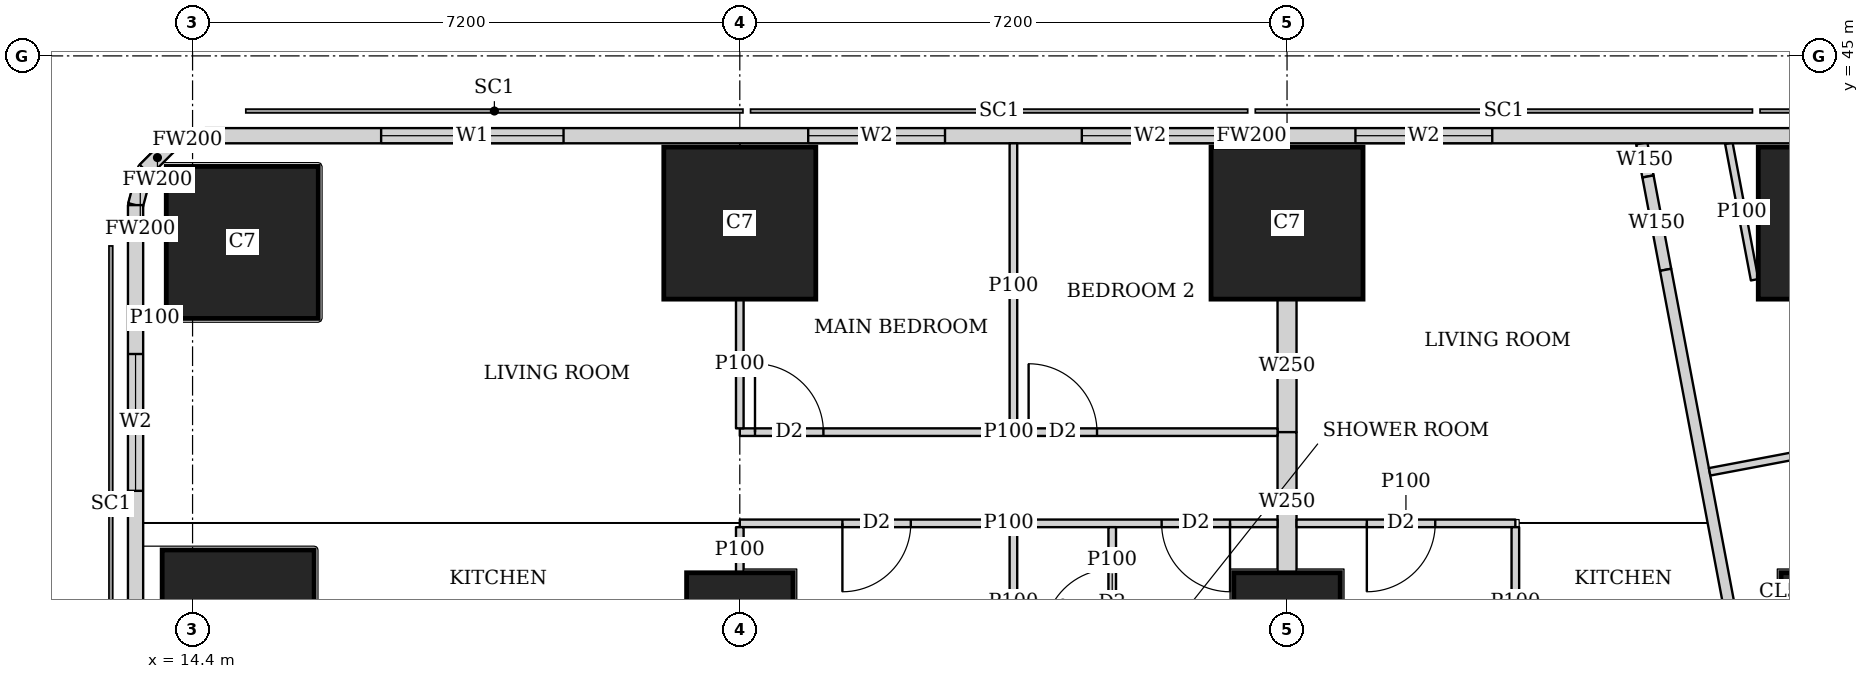
"""IFC4 building model, lengths in metres.
Left out: names, types, materials, properties, quantities, classifications, styles, units other than length and angle.
Written with IfcOpenShell. Run it as: python <this file> out.ifc"""

import sys

from ifc_helpers import new_model, si_unit, direction, frame, frame_2d, origin, origin_2d, place, context, subcontext, project, spatial, rectangle, extrude, element, fill, save


model = new_model("IFC4")
c1 = context("Model", 3, precision=1e-05, world=origin(), true_north=direction((0.0, 1.0)))
c2 = subcontext(c1, "Body", "Model", "MODEL_VIEW")
j1 = project(units=[si_unit("LENGTHUNIT", "METRE"), si_unit("PLANEANGLEUNIT", "RADIAN")], contexts=[c1])
p1 = place(None, origin())
s1 = spatial("IfcSite", under=j1, at=p1, CompositionType="ELEMENT")
p2 = place(p1, origin())
s2 = spatial("IfcBuilding", under=s1, at=p2, CompositionType="ELEMENT")
p3 = place(p2, frame((0.0, 0.0, 277.85)))
s3 = spatial("IfcBuildingStorey", under=s2, at=p3, CompositionType="ELEMENT", Elevation=277.85)
p4 = place(p3, frame((15.0, 37.5, 0.0), z_axis=(0.0, 0.0, 1.0), x_axis=(1.0, 0.0, 0.0)))
e1 = element("IfcColumn", 1, at=p4, inside=s3, PredefinedType="COLUMN", context=c2, shape_type="SweptSolid", body=[
    extrude(rectangle(XDim=2.0, YDim=2.0, at=origin_2d()), origin(), (0.0, 0.0, 1.0), 3.75),
])
for number, where, z_axis, x_axis in (
    (2, (21.6, 37.5, 0.0), (0.0, 0.0, 1.0), (1.0, 0.0, 0.0)),
    (3, (28.8, 37.5, 0.0), (0.0, 0.0, 1.0), (1.0, 0.0, 0.0)),
    (4, (36.0, 37.5, 0.0), (0.0, 0.0, 1.0), (1.0, 0.0, 0.0)),
):
    element("IfcColumn", number, at=place(p3, frame(where, z_axis=z_axis, x_axis=x_axis)), inside=s3, PredefinedType="COLUMN", context=c2, shape_type="SweptSolid", body=[
        extrude(rectangle(XDim=1.4, YDim=1.4, at=origin_2d()), origin(), (0.0, 0.0, 1.0), 3.75),
    ])
for number, where, z_axis, x_axis in (
    (5, (15.054, 42.546, 0.0), (0.0, 0.0, 1.0), (1.0, 0.0, 0.0)),
    (6, (21.6, 42.8, 0.0), (0.0, 0.0, 1.0), (1.0, 0.0, 0.0)),
    (7, (28.8, 42.8, 0.0), (0.0, 0.0, 1.0), (1.0, 0.0, 0.0)),
    (8, (36.0, 42.8, 0.0), (0.0, 0.0, 1.0), (1.0, 0.0, 0.0)),
):
    element("IfcColumn", number, at=place(p3, frame(where, z_axis=z_axis, x_axis=x_axis)), inside=s3, PredefinedType="COLUMN", context=c2, shape_type="SweptSolid", body=[
        extrude(rectangle(XDim=2.0, YDim=2.0, at=origin_2d()), origin(), (0.0, 0.0, 1.0), 3.75),
    ])
p5 = place(p3, frame((42.103, 43.95, 0.0), z_axis=(0.0, 0.0, 1.0), x_axis=(-1.0, 0.0, 0.0)))
e9 = element("IfcWall", 9, at=p5, inside=s3, PredefinedType="SOLIDWALL", context=c2, shape_type="SweptSolid", body=[
    extrude(rectangle(XDim=27.54, YDim=0.2, at=frame_2d((13.77, 0.0))), origin(), (0.0, 0.0, 1.0), 3.5),
])
p6 = place(p5, frame((10.603, 0.0, 0.9)))
e10 = element("IfcOpeningElement", 10, at=p6, cuts=e9, PredefinedType="OPENING", context=c2, shape_type="SweptSolid", body=[
    extrude(rectangle(XDim=1.8, YDim=1.5, at=frame_2d((0.9, 0.75))), frame((0.0, 0.11, 0.0), z_axis=(0.0, -1.0, 0.0), x_axis=(1.0, 0.0, 0.0)), (0.0, 0.0, 1.0), 0.22),
])
p7 = place(p5, frame((14.203, 0.0, 0.9)))
e11 = element("IfcOpeningElement", 11, at=p7, cuts=e9, PredefinedType="OPENING", context=c2, shape_type="SweptSolid", body=[
    extrude(rectangle(XDim=1.8, YDim=1.5, at=frame_2d((0.9, 0.75))), frame((0.0, 0.11, 0.0), z_axis=(0.0, -1.0, 0.0), x_axis=(1.0, 0.0, 0.0)), (0.0, 0.0, 1.0), 0.22),
])
p8 = place(p5, frame((17.803, 0.0, 0.9)))
e12 = element("IfcOpeningElement", 12, at=p8, cuts=e9, PredefinedType="OPENING", context=c2, shape_type="SweptSolid", body=[
    extrude(rectangle(XDim=1.8, YDim=1.5, at=frame_2d((0.9, 0.75))), frame((0.0, 0.11, 0.0), z_axis=(0.0, -1.0, 0.0), x_axis=(1.0, 0.0, 0.0)), (0.0, 0.0, 1.0), 0.22),
])
p9 = place(p5, frame((22.822, 0.0, 0.9)))
e13 = element("IfcOpeningElement", 13, at=p9, cuts=e9, PredefinedType="OPENING", context=c2, shape_type="SweptSolid", body=[
    extrude(rectangle(XDim=2.4, YDim=1.5, at=frame_2d((1.2, 0.75))), frame((0.0, 0.11, 0.0), z_axis=(0.0, -1.0, 0.0), x_axis=(1.0, 0.0, 0.0)), (0.0, 0.0, 1.0), 0.22),
])
p10 = place(p3, frame((14.563, 43.95, 0.0), z_axis=(0.0, 0.0, 1.0), x_axis=(-0.965655254015, -0.259826731483, 0.0)))
e14 = element("IfcWall", 14, at=p10, inside=s3, PredefinedType="SOLIDWALL", context=c2, shape_type="SweptSolid", body=[
    extrude(rectangle(XDim=0.477, YDim=0.2, at=frame_2d((0.239, 0.0))), origin(), (0.0, 0.0, 1.0), 3.5),
])
p11 = place(p3, frame((14.102, 43.826, 0.0), z_axis=(0.0, 0.0, 1.0), x_axis=(-0.707369890659, -0.706843573776, 0.0)))
e15 = element("IfcWall", 15, at=p11, inside=s3, PredefinedType="SOLIDWALL", context=c2, shape_type="SweptSolid", body=[
    extrude(rectangle(XDim=0.464, YDim=0.2, at=frame_2d((0.232, 0.0))), origin(), (0.0, 0.0, 1.0), 3.5),
])
p12 = place(p3, frame((13.774, 43.498, 0.0), z_axis=(0.0, 0.0, 1.0), x_axis=(-0.259826731483, -0.965655254015, 0.0)))
e16 = element("IfcWall", 16, at=p12, inside=s3, PredefinedType="SOLIDWALL", context=c2, shape_type="SweptSolid", body=[
    extrude(rectangle(XDim=0.477, YDim=0.2, at=frame_2d((0.239, 0.0))), origin(), (0.0, 0.0, 1.0), 3.5),
])
p13 = place(p3, frame((13.65, 43.037, 0.0), z_axis=(0.0, 0.0, 1.0), x_axis=(0.0, -1.0, 0.0)))
e17 = element("IfcWall", 17, at=p13, inside=s3, PredefinedType="SOLIDWALL", context=c2, shape_type="SweptSolid", body=[
    extrude(rectangle(XDim=35.374, YDim=0.2, at=frame_2d((17.687, 0.0))), origin(), (0.0, 0.0, 1.0), 3.5),
])
p14 = place(p13, frame((1.959, 0.0, 0.9)))
e18 = element("IfcOpeningElement", 18, at=p14, cuts=e17, PredefinedType="OPENING", context=c2, shape_type="SweptSolid", body=[
    extrude(rectangle(XDim=1.8, YDim=1.5, at=frame_2d((0.9, 0.75))), frame((0.0, 0.11, 0.0), z_axis=(0.0, -1.0, 0.0), x_axis=(1.0, 0.0, 0.0)), (0.0, 0.0, 1.0), 0.22),
])
p15 = place(p3, frame((33.467, 43.85, 0.0), z_axis=(0.0, 0.0, 1.0), x_axis=(0.184886516626, -0.982759877066, 0.0)))
e19 = element("IfcWall", 19, at=p15, inside=s3, PredefinedType="SOLIDWALL", context=c2, shape_type="SweptSolid", body=[
    extrude(rectangle(XDim=0.444, YDim=0.15, at=frame_2d((0.222, 0.0))), origin(), (0.0, 0.0, 1.0), 3.5),
])
p16 = place(p3, frame((33.549, 43.414, 0.0), z_axis=(0.0, 0.0, 1.0), x_axis=(0.185585816539, -0.982628060204, 0.0)))
e20 = element("IfcWall", 20, at=p16, inside=s3, PredefinedType="SOLIDWALL", context=c2, shape_type="SweptSolid", body=[
    extrude(rectangle(XDim=1.25, YDim=0.15, at=frame_2d((0.625, 0.0))), origin(), (0.0, 0.0, 1.0), 2.05),
])
p17 = place(p3, frame((33.781, 42.186, 0.0), z_axis=(0.0, 0.0, 1.0), x_axis=(0.185593518645, -0.9826266055, 0.0)))
e21 = element("IfcWall", 21, at=p17, inside=s3, PredefinedType="SOLIDWALL", context=c2, shape_type="SweptSolid", body=[
    extrude(rectangle(XDim=35.961, YDim=0.15, at=frame_2d((17.98, 0.0))), origin(), (0.0, 0.0, 1.0), 2.5),
])
p18 = place(p17, frame((11.76, 0.0, 0.0)))
e22 = element("IfcOpeningElement", 22, at=p18, cuts=e21, PredefinedType="OPENING", context=c2, shape_type="SweptSolid", body=[
    extrude(rectangle(XDim=1.0, YDim=2.1, at=frame_2d((0.5, 1.05))), frame((0.0, 0.085, 0.0), z_axis=(0.0, -1.0, 0.0), x_axis=(1.0, 0.0, 0.0)), (0.0, 0.0, 1.0), 0.17),
])
p19 = place(p17, frame((15.576, 0.0, 0.0)))
e23 = element("IfcOpeningElement", 23, at=p19, cuts=e21, PredefinedType="OPENING", context=c2, shape_type="SweptSolid", body=[
    extrude(rectangle(XDim=1.0, YDim=2.1, at=frame_2d((0.5, 1.05))), frame((0.0, 0.085, 0.0), z_axis=(0.0, -1.0, 0.0), x_axis=(1.0, 0.0, 0.0)), (0.0, 0.0, 1.0), 0.17),
])
p20 = place(p17, frame((30.502, 0.0, 0.0)))
e24 = element("IfcOpeningElement", 24, at=p20, cuts=e21, PredefinedType="OPENING", context=c2, shape_type="SweptSolid", body=[
    extrude(rectangle(XDim=1.0, YDim=2.1, at=frame_2d((0.5, 1.05))), frame((0.0, 0.085, 0.0), z_axis=(0.0, -1.0, 0.0), x_axis=(1.0, 0.0, 0.0)), (0.0, 0.0, 1.0), 0.17),
])
p21 = place(p3, frame((34.952, 42.055, 0.0), z_axis=(0.0, 0.0, 1.0), x_axis=(-0.185490642006, 0.98264603074, 0.0)))
e25 = element("IfcWall", 25, at=p21, inside=s3, PredefinedType="PARTITIONING", context=c2, shape_type="SweptSolid", body=[
    extrude(rectangle(XDim=1.827, YDim=0.1, at=frame_2d((0.914, 0.0))), origin(), (0.0, 0.0, 1.0), 2.05),
])
p22 = place(p3, frame((37.823, 40.182, 0.0), z_axis=(0.0, 0.0, 1.0), x_axis=(-0.98263926043, -0.185526504472, 0.0)))
e26 = element("IfcWall", 26, at=p22, inside=s3, PredefinedType="PARTITIONING", context=c2, shape_type="SweptSolid", body=[
    extrude(rectangle(XDim=3.524, YDim=0.1, at=frame_2d((1.762, 0.0))), origin(), (0.0, 0.0, 1.0), 3.5),
])
p23 = place(p3, frame((14.054, 41.546, 0.0), z_axis=(0.0, 0.0, 1.0), x_axis=(-1.0, 0.0, 0.0)))
e27 = element("IfcWall", 27, at=p23, inside=s3, PredefinedType="PARTITIONING", context=c2, shape_type="SweptSolid", body=[
    extrude(rectangle(XDim=0.304, YDim=0.1, at=frame_2d((0.152, 0.0))), origin(), (0.0, 0.0, 1.0), 3.5),
])
p24 = place(p3, frame((21.6, 40.05, 0.0), z_axis=(0.0, 0.0, 1.0), x_axis=(1.0, 0.0, 0.0)))
e28 = element("IfcWall", 28, at=p24, inside=s3, PredefinedType="PARTITIONING", context=c2, shape_type="SweptSolid", body=[
    extrude(rectangle(XDim=7.075, YDim=0.1, at=frame_2d((3.538, 0.0))), origin(), (0.0, 0.0, 1.0), 3.5),
])
p25 = place(p24, frame((0.2, 0.0, 0.0)))
e29 = element("IfcOpeningElement", 29, at=p25, cuts=e28, PredefinedType="OPENING", context=c2, shape_type="SweptSolid", body=[
    extrude(rectangle(XDim=0.9, YDim=2.1, at=frame_2d((0.45, 1.05))), frame((0.0, 0.06, 0.0), z_axis=(0.0, -1.0, 0.0), x_axis=(1.0, 0.0, 0.0)), (0.0, 0.0, 1.0), 0.12),
])
p26 = place(p24, frame((3.8, 0.0, 0.0)))
e30 = element("IfcOpeningElement", 30, at=p26, cuts=e28, PredefinedType="OPENING", context=c2, shape_type="SweptSolid", body=[
    extrude(rectangle(XDim=0.9, YDim=2.1, at=frame_2d((0.45, 1.05))), frame((0.0, 0.06, 0.0), z_axis=(0.0, -1.0, 0.0), x_axis=(1.0, 0.0, 0.0)), (0.0, 0.0, 1.0), 0.12),
])
p27 = place(p3, frame((21.6, 38.85, 0.0), z_axis=(0.0, 0.0, 1.0), x_axis=(1.0, 0.0, 0.0)))
e31 = element("IfcWall", 31, at=p27, inside=s3, PredefinedType="PARTITIONING", context=c2, shape_type="SweptSolid", body=[
    extrude(rectangle(XDim=7.075, YDim=0.1, at=frame_2d((3.538, 0.0))), origin(), (0.0, 0.0, 1.0), 3.5),
])
p28 = place(p27, frame((1.35, 0.0, 0.0)))
e32 = element("IfcOpeningElement", 32, at=p28, cuts=e31, PredefinedType="OPENING", context=c2, shape_type="SweptSolid", body=[
    extrude(rectangle(XDim=0.9, YDim=2.1, at=frame_2d((0.45, 1.05))), frame((0.0, 0.06, 0.0), z_axis=(0.0, -1.0, 0.0), x_axis=(1.0, 0.0, 0.0)), (0.0, 0.0, 1.0), 0.12),
])
p29 = place(p27, frame((5.55, 0.0, 0.0)))
e33 = element("IfcOpeningElement", 33, at=p29, cuts=e31, PredefinedType="OPENING", context=c2, shape_type="SweptSolid", body=[
    extrude(rectangle(XDim=0.9, YDim=2.1, at=frame_2d((0.45, 1.05))), frame((0.0, 0.06, 0.0), z_axis=(0.0, -1.0, 0.0), x_axis=(1.0, 0.0, 0.0)), (0.0, 0.0, 1.0), 0.12),
])
p30 = place(p3, frame((21.6, 40.1, 0.0), z_axis=(0.0, 0.0, 1.0), x_axis=(0.0, 1.0, 0.0)))
e34 = element("IfcWall", 34, at=p30, inside=s3, PredefinedType="PARTITIONING", context=c2, shape_type="SweptSolid", body=[
    extrude(rectangle(XDim=1.699, YDim=0.1, at=frame_2d((0.85, 0.0))), origin(), (0.0, 0.0, 1.0), 3.5),
])
p31 = place(p3, frame((25.2, 40.1, 0.0), z_axis=(0.0, 0.0, 1.0), x_axis=(0.0, 1.0, 0.0)))
e35 = element("IfcWall", 35, at=p31, inside=s3, PredefinedType="PARTITIONING", context=c2, shape_type="SweptSolid", body=[
    extrude(rectangle(XDim=3.75, YDim=0.1, at=frame_2d((1.875, 0.0))), origin(), (0.0, 0.0, 1.0), 2.05),
])
p32 = place(p3, frame((21.6, 38.201, 0.0), z_axis=(0.0, 0.0, 1.0), x_axis=(0.0, 1.0, 0.0)))
e36 = element("IfcWall", 36, at=p32, inside=s3, PredefinedType="PARTITIONING", context=c2, shape_type="SweptSolid", body=[
    extrude(rectangle(XDim=0.599, YDim=0.1, at=frame_2d((0.3, 0.0))), origin(), (0.0, 0.0, 1.0), 3.5),
])
p33 = place(p3, frame((25.2, 36.825, 0.0), z_axis=(0.0, 0.0, 1.0), x_axis=(0.0, 1.0, 0.0)))
e37 = element("IfcWall", 37, at=p33, inside=s3, PredefinedType="PARTITIONING", context=c2, shape_type="SweptSolid", body=[
    extrude(rectangle(XDim=1.975, YDim=0.1, at=frame_2d((0.988, 0.0))), origin(), (0.0, 0.0, 1.0), 3.5),
])
p34 = place(p3, frame((26.5, 36.825, 0.0), z_axis=(0.0, 0.0, 1.0), x_axis=(0.0, 1.0, 0.0)))
e38 = element("IfcWall", 38, at=p34, inside=s3, PredefinedType="PARTITIONING", context=c2, shape_type="SweptSolid", body=[
    extrude(rectangle(XDim=1.975, YDim=0.1, at=frame_2d((0.988, 0.0))), origin(), (0.0, 0.0, 1.0), 3.5),
])
p35 = place(p34, frame((0.525, 0.0, 0.0)))
e39 = element("IfcOpeningElement", 39, at=p35, cuts=e38, PredefinedType="OPENING", context=c2, shape_type="SweptSolid", body=[
    extrude(rectangle(XDim=0.9, YDim=2.1, at=frame_2d((0.45, 1.05))), frame((0.0, 0.06, 0.0), z_axis=(0.0, -1.0, 0.0), x_axis=(1.0, 0.0, 0.0)), (0.0, 0.0, 1.0), 0.12),
])
p36 = place(p3, frame((28.925, 38.85, 0.0), z_axis=(0.0, 0.0, 1.0), x_axis=(1.0, 0.0, 0.0)))
e40 = element("IfcWall", 40, at=p36, inside=s3, PredefinedType="PARTITIONING", context=c2, shape_type="SweptSolid", body=[
    extrude(rectangle(XDim=2.879, YDim=0.1, at=frame_2d((1.439, 0.0))), origin(), (0.0, 0.0, 1.0), 3.5),
])
p37 = place(p36, frame((0.925, 0.0, 0.0)))
e41 = element("IfcOpeningElement", 41, at=p37, cuts=e40, PredefinedType="OPENING", context=c2, shape_type="SweptSolid", body=[
    extrude(rectangle(XDim=0.9, YDim=2.1, at=frame_2d((0.45, 1.05))), frame((0.0, 0.06, 0.0), z_axis=(0.0, -1.0, 0.0), x_axis=(1.0, 0.0, 0.0)), (0.0, 0.0, 1.0), 0.12),
])
p38 = place(p3, frame((31.804, 36.825, 0.0), z_axis=(0.0, 0.0, 1.0), x_axis=(0.0, 1.0, 0.0)))
e42 = element("IfcWall", 42, at=p38, inside=s3, PredefinedType="PARTITIONING", context=c2, shape_type="SweptSolid", body=[
    extrude(rectangle(XDim=1.975, YDim=0.1, at=frame_2d((0.988, 0.0))), origin(), (0.0, 0.0, 1.0), 3.5),
])
p39 = place(p3, frame((28.8, 40.05, 0.0), z_axis=(0.0, 0.0, 1.0), x_axis=(0.0, 1.0, 0.0)))
e43 = element("IfcWall", 43, at=p39, inside=s3, PredefinedType="SOLIDWALL", context=c2, shape_type="SweptSolid", body=[
    extrude(rectangle(XDim=1.749, YDim=0.25, at=frame_2d((0.875, 0.0))), origin(), (0.0, 0.0, 1.0), 3.5),
])
p40 = place(p3, frame((28.8, 38.201, 0.0), z_axis=(0.0, 0.0, 1.0), x_axis=(0.0, 1.0, 0.0)))
e44 = element("IfcWall", 44, at=p40, inside=s3, PredefinedType="SOLIDWALL", context=c2, shape_type="SweptSolid", body=[
    extrude(rectangle(XDim=1.849, YDim=0.25, at=frame_2d((0.925, 0.0))), origin(), (0.0, 0.0, 1.0), 3.5),
])
p41 = place(p6, origin())
e45 = element("IfcWindow", 45, at=p41, inside=s3, PartitioningType="SINGLE_PANEL", PredefinedType="WINDOW", context=c2, shape_type="SweptSolid", body=[
    extrude(rectangle(XDim=1.8, YDim=1.5, at=frame_2d((0.9, 0.75))), frame((0.0, 0.03, 0.0), z_axis=(0.0, -1.0, 0.0), x_axis=(1.0, 0.0, 0.0)), (0.0, 0.0, 1.0), 0.06),
])
fill(e10, e45)
p42 = place(p7, origin())
e46 = element("IfcWindow", 46, at=p42, inside=s3, PartitioningType="SINGLE_PANEL", PredefinedType="WINDOW", context=c2, shape_type="SweptSolid", body=[
    extrude(rectangle(XDim=1.8, YDim=1.5, at=frame_2d((0.9, 0.75))), frame((0.0, 0.03, 0.0), z_axis=(0.0, -1.0, 0.0), x_axis=(1.0, 0.0, 0.0)), (0.0, 0.0, 1.0), 0.06),
])
fill(e11, e46)
p43 = place(p8, origin())
e47 = element("IfcWindow", 47, at=p43, inside=s3, PartitioningType="SINGLE_PANEL", PredefinedType="WINDOW", context=c2, shape_type="SweptSolid", body=[
    extrude(rectangle(XDim=1.8, YDim=1.5, at=frame_2d((0.9, 0.75))), frame((0.0, 0.03, 0.0), z_axis=(0.0, -1.0, 0.0), x_axis=(1.0, 0.0, 0.0)), (0.0, 0.0, 1.0), 0.06),
])
fill(e12, e47)
p44 = place(p9, origin())
e48 = element("IfcWindow", 48, at=p44, inside=s3, PartitioningType="SINGLE_PANEL", PredefinedType="WINDOW", context=c2, shape_type="SweptSolid", body=[
    extrude(rectangle(XDim=2.4, YDim=1.5, at=frame_2d((1.2, 0.75))), frame((0.0, 0.03, 0.0), z_axis=(0.0, -1.0, 0.0), x_axis=(1.0, 0.0, 0.0)), (0.0, 0.0, 1.0), 0.06),
])
fill(e13, e48)
p45 = place(p14, origin())
e49 = element("IfcWindow", 49, at=p45, inside=s3, PartitioningType="SINGLE_PANEL", PredefinedType="WINDOW", context=c2, shape_type="SweptSolid", body=[
    extrude(rectangle(XDim=1.8, YDim=1.5, at=frame_2d((0.9, 0.75))), frame((0.0, 0.03, 0.0), z_axis=(0.0, -1.0, 0.0), x_axis=(1.0, 0.0, 0.0)), (0.0, 0.0, 1.0), 0.06),
])
fill(e18, e49)
p46 = place(p25, origin())
e50 = element("IfcDoor", 50, at=p46, inside=s3, OperationType="SINGLE_SWING_LEFT", PredefinedType="DOOR", context=c2, shape_type="SweptSolid", body=[
    extrude(rectangle(XDim=0.9, YDim=2.1, at=frame_2d((0.45, 1.05))), frame((0.0, 0.025, 0.0), z_axis=(0.0, -1.0, 0.0), x_axis=(1.0, 0.0, 0.0)), (0.0, 0.0, 1.0), 0.05),
])
fill(e29, e50)
p47 = place(p26, origin())
e51 = element("IfcDoor", 51, at=p47, inside=s3, OperationType="SINGLE_SWING_LEFT", PredefinedType="DOOR", context=c2, shape_type="SweptSolid", body=[
    extrude(rectangle(XDim=0.9, YDim=2.1, at=frame_2d((0.45, 1.05))), frame((0.0, 0.025, 0.0), z_axis=(0.0, -1.0, 0.0), x_axis=(1.0, 0.0, 0.0)), (0.0, 0.0, 1.0), 0.05),
])
fill(e30, e51)
p48 = place(p28, origin())
e52 = element("IfcDoor", 52, at=p48, inside=s3, OperationType="SINGLE_SWING_RIGHT", PredefinedType="DOOR", context=c2, shape_type="SweptSolid", body=[
    extrude(rectangle(XDim=0.9, YDim=2.1, at=frame_2d((0.45, 1.05))), frame((0.0, 0.025, 0.0), z_axis=(0.0, -1.0, 0.0), x_axis=(1.0, 0.0, 0.0)), (0.0, 0.0, 1.0), 0.05),
])
fill(e32, e52)
p49 = place(p29, origin())
e53 = element("IfcDoor", 53, at=p49, inside=s3, OperationType="SINGLE_SWING_LEFT", PredefinedType="DOOR", context=c2, shape_type="SweptSolid", body=[
    extrude(rectangle(XDim=0.9, YDim=2.1, at=frame_2d((0.45, 1.05))), frame((0.0, 0.025, 0.0), z_axis=(0.0, -1.0, 0.0), x_axis=(1.0, 0.0, 0.0)), (0.0, 0.0, 1.0), 0.05),
])
fill(e33, e53)
p50 = place(p35, origin())
e54 = element("IfcDoor", 54, at=p50, inside=s3, OperationType="SINGLE_SWING_LEFT", PredefinedType="DOOR", context=c2, shape_type="SweptSolid", body=[
    extrude(rectangle(XDim=0.9, YDim=2.1, at=frame_2d((0.45, 1.05))), frame((0.0, 0.025, 0.0), z_axis=(0.0, -1.0, 0.0), x_axis=(1.0, 0.0, 0.0)), (0.0, 0.0, 1.0), 0.05),
])
fill(e39, e54)
p51 = place(p37, origin())
e55 = element("IfcDoor", 55, at=p51, inside=s3, OperationType="SINGLE_SWING_RIGHT", PredefinedType="DOOR", context=c2, shape_type="SweptSolid", body=[
    extrude(rectangle(XDim=0.9, YDim=2.1, at=frame_2d((0.45, 1.05))), frame((0.0, 0.025, 0.0), z_axis=(0.0, -1.0, 0.0), x_axis=(1.0, 0.0, 0.0)), (0.0, 0.0, 1.0), 0.05),
])
fill(e41, e55)
save(model, sys.argv[1])
